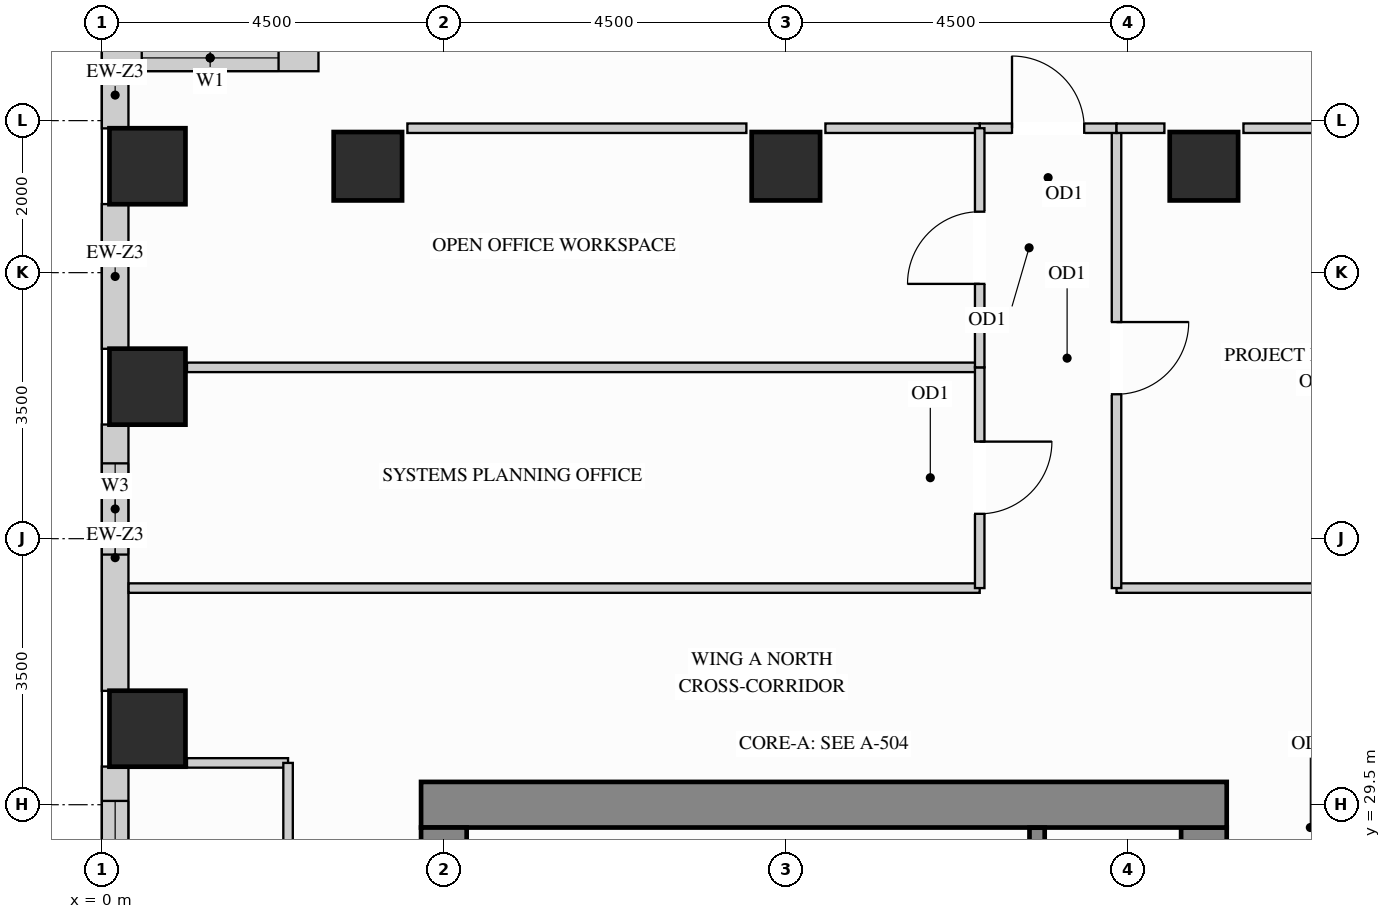
"""IFC4 building model, lengths in metres.
Left out: names, types, materials, properties, quantities, classifications, styles, units other than length and angle.
Written with IfcOpenShell. Run it as: python <this file> out.ifc"""

import sys

from ifc_helpers import new_model, si_unit, direction, frame, frame_2d, origin, origin_2d, place, context, subcontext, project, spatial, rectangle, extrude, source, transform, mapped, element, fill, save


model = new_model("IFC4")
c1 = context("Model", 3, precision=1e-05, world=origin(), true_north=direction((0.0, 1.0)))
c2 = subcontext(c1, "Body", "Model", "MODEL_VIEW")
j1 = project(units=[si_unit("LENGTHUNIT", "METRE"), si_unit("PLANEANGLEUNIT", "RADIAN")], contexts=[c1])
p1 = place(None, origin())
s1 = spatial("IfcSite", under=j1, at=p1, CompositionType="ELEMENT")
p2 = place(p1, origin())
s2 = spatial("IfcBuilding", under=s1, at=p2, CompositionType="ELEMENT")
p3 = place(p2, frame((0.0, 0.0, 197.1)))
s3 = spatial("IfcBuildingStorey", under=s2, at=p3, CompositionType="ELEMENT", Elevation=197.1)
m1 = source(origin(), c2, "Body", "SweptSolid", [
    extrude(rectangle(XDim=0.9, YDim=0.9, at=origin_2d()), origin(), (0.0, 0.0, 1.0), 3.4),
])
for number, where, z_axis, x_axis in (
    (1, (14.5, 37.9, 0.0), (0.0, 0.0, 1.0), (1.0, 0.0, 0.0)),
    (2, (3.5, 37.9, 0.0), (0.0, 0.0, 1.0), (1.0, 0.0, 0.0)),
    (3, (9.0, 37.9, 0.0), (0.0, 0.0, 1.0), (1.0, 0.0, 0.0)),
):
    element("IfcColumn", number, at=place(p3, frame(where, z_axis=z_axis, x_axis=x_axis)), inside=s3, PredefinedType="COLUMN", context=c2, shape_type="MappedRepresentation", body=[
        mapped(m1, transform((0.0, 0.0, 0.0), x_axis=(1.0, 0.0, 0.0), y_axis=(0.0, 1.0, 0.0), z_axis=(0.0, 0.0, 1.0))),
    ])
m2 = source(origin(), c2, "Body", "SweptSolid", [
    extrude(rectangle(XDim=1.0, YDim=1.0, at=origin_2d()), origin(), (0.0, 0.0, 1.0), 3.4),
])
for number, where, z_axis, x_axis in (
    (4, (0.6, 30.5, 0.0), (0.0, 0.0, 1.0), (1.0, 0.0, 0.0)),
    (5, (0.6, 35.0, 0.0), (0.0, 0.0, 1.0), (1.0, 0.0, 0.0)),
    (6, (0.6, 37.9, 0.0), (0.0, 0.0, 1.0), (1.0, 0.0, 0.0)),
):
    element("IfcColumn", number, at=place(p3, frame(where, z_axis=z_axis, x_axis=x_axis)), inside=s3, PredefinedType="COLUMN", context=c2, shape_type="MappedRepresentation", body=[
        mapped(m2, transform((0.0, 0.0, 0.0), x_axis=(1.0, 0.0, 0.0), y_axis=(0.0, 1.0, 0.0), z_axis=(0.0, 0.0, 1.0))),
    ])
m3 = source(origin(), c2, "Body", "SweptSolid", [
    extrude(rectangle(XDim=8.32, YDim=0.6, at=frame_2d((4.16, 0.0))), origin(), (0.0, 0.0, 1.0), 3.4),
])
p4 = place(p3, frame((14.5, 20.88, 0.0), z_axis=(0.0, 0.0, 1.0), x_axis=(0.0, 1.0, 0.0)))
e7 = element("IfcWall", 7, at=p4, inside=s3, PredefinedType="SHEAR", context=c2, shape_type="MappedRepresentation", body=[
    mapped(m3, transform((0.0, 0.0, 0.0), x_axis=(1.0, 0.0, 0.0), y_axis=(0.0, 1.0, 0.0), z_axis=(0.0, 0.0, 1.0))),
])
m4 = source(origin(), c2, "Body", "SweptSolid", [
    extrude(rectangle(XDim=10.6, YDim=0.6, at=frame_2d((5.3, 0.0))), origin(), (0.0, 0.0, 1.0), 3.4),
])
p5 = place(p3, frame((4.2, 29.5, 0.0), z_axis=(0.0, 0.0, 1.0), x_axis=(1.0, 0.0, 0.0)))
e8 = element("IfcWall", 8, at=p5, inside=s3, PredefinedType="SHEAR", context=c2, shape_type="MappedRepresentation", body=[
    mapped(m4, transform((0.0, 0.0, 0.0), x_axis=(1.0, 0.0, 0.0), y_axis=(0.0, 1.0, 0.0), z_axis=(0.0, 0.0, 1.0))),
])
m5 = source(origin(), c2, "Body", "SweptSolid", [
    extrude(rectangle(XDim=20.4, YDim=0.6, at=frame_2d((10.2, 0.0))), origin(), (0.0, 0.0, 1.0), 3.4),
])
p6 = place(p3, frame((4.5, 8.8, 0.0), z_axis=(0.0, 0.0, 1.0), x_axis=(0.0, 1.0, 0.0)))
e9 = element("IfcWall", 9, at=p6, inside=s3, PredefinedType="SHEAR", context=c2, shape_type="MappedRepresentation", body=[
    mapped(m5, transform((0.0, 0.0, 0.0), x_axis=(1.0, 0.0, 0.0), y_axis=(0.0, 1.0, 0.0), z_axis=(0.0, 0.0, 1.0))),
])
p7 = place(p3, frame((2.85, 39.325, 0.0), z_axis=(0.0, 0.0, 1.0), x_axis=(-1.0, 0.0, 0.0)))
e10 = element("IfcWall", 10, at=p7, inside=s3, PredefinedType="SOLIDWALL", context=c2, shape_type="SweptSolid", body=[
    extrude(rectangle(XDim=2.85, YDim=0.35, at=frame_2d((1.425, 0.0))), origin(), (0.0, 0.0, 1.0), 3.385),
])
p8 = place(p7, frame((0.525, 0.0, 0.78)))
e11 = element("IfcOpeningElement", 11, at=p8, cuts=e10, PredefinedType="OPENING", context=c2, shape_type="SweptSolid", body=[
    extrude(rectangle(XDim=1.8, YDim=2.1, at=frame_2d((0.9, 1.05))), frame((0.0, 0.185, 0.0), z_axis=(0.0, -1.0, 0.0), x_axis=(1.0, 0.0, 0.0)), (0.0, 0.0, 1.0), 0.37),
])
m6 = source(origin(), c2, "Body", "SweptSolid", [
    extrude(rectangle(XDim=0.754, YDim=0.35, at=frame_2d((0.377, 0.0))), origin(), (0.0, 0.0, 1.0), 3.385),
])
p9 = place(p3, frame((0.175, 39.152, 0.0), z_axis=(0.0, 0.0, 1.0), x_axis=(0.0, -1.0, 0.0)))
e12 = element("IfcWall", 12, at=p9, inside=s3, PredefinedType="SOLIDWALL", context=c2, shape_type="MappedRepresentation", body=[
    mapped(m6, transform((0.0, 0.0, 0.0), x_axis=(1.0, 0.0, 0.0), y_axis=(0.0, 1.0, 0.0), z_axis=(0.0, 0.0, 1.0))),
])
m7 = source(origin(), c2, "Body", "SweptSolid", [
    extrude(rectangle(XDim=1.904, YDim=0.35, at=frame_2d((0.952, 0.0))), origin(), (0.0, 0.0, 1.0), 2.612),
])
p10 = place(p3, frame((0.175, 37.402, 0.0), z_axis=(0.0, 0.0, 1.0), x_axis=(0.0, -1.0, 0.0)))
e13 = element("IfcWall", 13, at=p10, inside=s3, PredefinedType="SOLIDWALL", context=c2, shape_type="MappedRepresentation", body=[
    mapped(m7, transform((0.0, 0.0, 0.0), x_axis=(1.0, 0.0, 0.0), y_axis=(0.0, 1.0, 0.0), z_axis=(0.0, 0.0, 1.0))),
])
p11 = place(p3, frame((0.175, 34.502, 0.0), z_axis=(0.0, 0.0, 1.0), x_axis=(0.0, -1.0, 0.0)))
e14 = element("IfcWall", 14, at=p11, inside=s3, PredefinedType="SOLIDWALL", context=c2, shape_type="SweptSolid", body=[
    extrude(rectangle(XDim=3.504, YDim=0.35, at=frame_2d((1.752, 0.0))), origin(), (0.0, 0.0, 1.0), 2.612),
])
p12 = place(p11, frame((0.511, 0.0, 0.78)))
e15 = element("IfcOpeningElement", 15, at=p12, cuts=e14, PredefinedType="OPENING", context=c2, shape_type="SweptSolid", body=[
    extrude(rectangle(XDim=1.2, YDim=1.652, at=frame_2d((0.6, 0.826))), frame((0.0, 0.185, 0.0), z_axis=(0.0, -1.0, 0.0), x_axis=(1.0, 0.0, 0.0)), (0.0, 0.0, 1.0), 0.37),
])
p13 = place(p3, frame((0.175, 30.002, 0.0), z_axis=(0.0, 0.0, 1.0), x_axis=(0.0, -1.0, 0.0)))
e16 = element("IfcWall", 16, at=p13, inside=s3, PredefinedType="SOLIDWALL", context=c2, shape_type="SweptSolid", body=[
    extrude(rectangle(XDim=2.704, YDim=0.35, at=frame_2d((1.352, 0.0))), origin(), (0.0, 0.0, 1.0), 2.612),
])
p14 = place(p13, frame((0.452, 0.0, 0.78)))
e17 = element("IfcOpeningElement", 17, at=p14, cuts=e16, PredefinedType="OPENING", context=c2, shape_type="SweptSolid", body=[
    extrude(rectangle(XDim=1.8, YDim=1.652, at=frame_2d((0.9, 0.826))), frame((0.0, 0.185, 0.0), z_axis=(0.0, -1.0, 0.0), x_axis=(1.0, 0.0, 0.0)), (0.0, 0.0, 1.0), 0.37),
])
m8 = source(origin(), c2, "Body", "SweptSolid", [
    extrude(rectangle(XDim=5.798, YDim=0.125, at=frame_2d((2.899, 0.0))), origin(), (0.0, 0.0, 1.0), 3.385),
])
p15 = place(p3, frame((13.35, 32.35, 0.0), z_axis=(0.0, 0.0, 1.0), x_axis=(1.0, 0.0, 0.0)))
e18 = element("IfcWall", 18, at=p15, inside=s3, PredefinedType="PARTITIONING", context=c2, shape_type="MappedRepresentation", body=[
    mapped(m8, transform((0.0, 0.0, 0.0), x_axis=(1.0, 0.0, 0.0), y_axis=(0.0, 1.0, 0.0), z_axis=(0.0, 0.0, 1.0))),
])
m9 = source(origin(), c2, "Body", "SweptSolid", [
    extrude(rectangle(XDim=11.198, YDim=0.125, at=frame_2d((5.599, 0.0))), origin(), (0.0, 0.0, 1.0), 3.385),
])
p16 = place(p3, frame((0.352, 32.35, 0.0), z_axis=(0.0, 0.0, 1.0), x_axis=(1.0, 0.0, 0.0)))
e19 = element("IfcWall", 19, at=p16, inside=s3, PredefinedType="PARTITIONING", context=c2, shape_type="MappedRepresentation", body=[
    mapped(m9, transform((0.0, 0.0, 0.0), x_axis=(1.0, 0.0, 0.0), y_axis=(0.0, 1.0, 0.0), z_axis=(0.0, 0.0, 1.0))),
])
m10 = source(origin(), c2, "Body", "SweptSolid", [
    extrude(rectangle(XDim=10.43, YDim=0.125, at=frame_2d((5.215, 0.0))), origin(), (0.0, 0.0, 1.0), 2.448),
])
p17 = place(p3, frame((1.12, 35.254, 0.0), z_axis=(0.0, 0.0, 1.0), x_axis=(1.0, 0.0, 0.0)))
e20 = element("IfcWall", 20, at=p17, inside=s3, PredefinedType="PARTITIONING", context=c2, shape_type="MappedRepresentation", body=[
    mapped(m10, transform((0.0, 0.0, 0.0), x_axis=(1.0, 0.0, 0.0), y_axis=(0.0, 1.0, 0.0), z_axis=(0.0, 0.0, 1.0))),
])
m11 = source(origin(), c2, "Body", "SweptSolid", [
    extrude(rectangle(XDim=1.33, YDim=0.125, at=frame_2d((0.665, 0.0))), origin(), (0.0, 0.0, 1.0), 3.385),
])
p18 = place(p3, frame((1.12, 30.05, 0.0), z_axis=(0.0, 0.0, 1.0), x_axis=(1.0, 0.0, 0.0)))
e21 = element("IfcWall", 21, at=p18, inside=s3, PredefinedType="PARTITIONING", context=c2, shape_type="MappedRepresentation", body=[
    mapped(m11, transform((0.0, 0.0, 0.0), x_axis=(1.0, 0.0, 0.0), y_axis=(0.0, 1.0, 0.0), z_axis=(0.0, 0.0, 1.0))),
])
p19 = place(p3, frame((13.35, 32.35, 0.0), z_axis=(0.0, 0.0, 1.0), x_axis=(0.0, 1.0, 0.0)))
e22 = element("IfcWall", 22, at=p19, inside=s3, PredefinedType="PARTITIONING", context=c2, shape_type="SweptSolid", body=[
    extrude(rectangle(XDim=6.05, YDim=0.125, at=frame_2d((3.025, 0.0))), origin(), (0.0, 0.0, 1.0), 3.385),
])
p20 = place(p19, frame((2.55, 0.0, 0.0)))
e23 = element("IfcOpeningElement", 23, at=p20, cuts=e22, PredefinedType="OPENING", context=c2, shape_type="SweptSolid", body=[
    extrude(rectangle(XDim=0.95, YDim=2.15, at=frame_2d((0.475, 1.075))), frame((0.0, 0.073, 0.0), z_axis=(0.0, -1.0, 0.0), x_axis=(1.0, 0.0, 0.0)), (0.0, 0.0, 1.0), 0.145),
])
p21 = place(p3, frame((11.55, 38.4, 0.0), z_axis=(0.0, 0.0, 1.0), x_axis=(1.0, 0.0, 0.0)))
e24 = element("IfcWall", 24, at=p21, inside=s3, PredefinedType="PARTITIONING", context=c2, shape_type="SweptSolid", body=[
    extrude(rectangle(XDim=1.8, YDim=0.125, at=frame_2d((0.9, 0.0))), origin(), (0.0, 0.0, 1.0), 3.385),
])
p22 = place(p21, frame((0.425, 0.0, 0.0)))
e25 = element("IfcOpeningElement", 25, at=p22, cuts=e24, PredefinedType="OPENING", context=c2, shape_type="SweptSolid", body=[
    extrude(rectangle(XDim=0.95, YDim=2.15, at=frame_2d((0.475, 1.075))), frame((0.0, 0.073, 0.0), z_axis=(0.0, -1.0, 0.0), x_axis=(1.0, 0.0, 0.0)), (0.0, 0.0, 1.0), 0.145),
])
m12 = source(origin(), c2, "Body", "SweptSolid", [
    extrude(rectangle(XDim=0.63, YDim=0.125, at=frame_2d((0.315, 0.0))), origin(), (0.0, 0.0, 1.0), 3.385),
])
p23 = place(p3, frame((13.35, 38.4, 0.0), z_axis=(0.0, 0.0, 1.0), x_axis=(1.0, 0.0, 0.0)))
e26 = element("IfcWall", 26, at=p23, inside=s3, PredefinedType="PARTITIONING", context=c2, shape_type="MappedRepresentation", body=[
    mapped(m12, transform((0.0, 0.0, 0.0), x_axis=(1.0, 0.0, 0.0), y_axis=(0.0, 1.0, 0.0), z_axis=(0.0, 0.0, 1.0))),
])
m13 = source(origin(), c2, "Body", "SweptSolid", [
    extrude(rectangle(XDim=1.88, YDim=0.125, at=frame_2d((0.94, 0.0))), origin(), (0.0, 0.0, 1.0), 3.385),
])
p24 = place(p3, frame((15.02, 38.4, 0.0), z_axis=(0.0, 0.0, 1.0), x_axis=(1.0, 0.0, 0.0)))
e27 = element("IfcWall", 27, at=p24, inside=s3, PredefinedType="PARTITIONING", context=c2, shape_type="MappedRepresentation", body=[
    mapped(m13, transform((0.0, 0.0, 0.0), x_axis=(1.0, 0.0, 0.0), y_axis=(0.0, 1.0, 0.0), z_axis=(0.0, 0.0, 1.0))),
])
m14 = source(origin(), c2, "Body", "SweptSolid", [
    extrude(rectangle(XDim=4.46, YDim=0.125, at=frame_2d((2.23, 0.0))), origin(), (0.0, 0.0, 1.0), 3.385),
])
p25 = place(p3, frame((4.02, 38.4, 0.0), z_axis=(0.0, 0.0, 1.0), x_axis=(1.0, 0.0, 0.0)))
e28 = element("IfcWall", 28, at=p25, inside=s3, PredefinedType="PARTITIONING", context=c2, shape_type="MappedRepresentation", body=[
    mapped(m14, transform((0.0, 0.0, 0.0), x_axis=(1.0, 0.0, 0.0), y_axis=(0.0, 1.0, 0.0), z_axis=(0.0, 0.0, 1.0))),
])
m15 = source(origin(), c2, "Body", "SweptSolid", [
    extrude(rectangle(XDim=2.03, YDim=0.125, at=frame_2d((1.015, 0.0))), origin(), (0.0, 0.0, 1.0), 3.385),
])
p26 = place(p3, frame((9.52, 38.4, 0.0), z_axis=(0.0, 0.0, 1.0), x_axis=(1.0, 0.0, 0.0)))
e29 = element("IfcWall", 29, at=p26, inside=s3, PredefinedType="PARTITIONING", context=c2, shape_type="MappedRepresentation", body=[
    mapped(m15, transform((0.0, 0.0, 0.0), x_axis=(1.0, 0.0, 0.0), y_axis=(0.0, 1.0, 0.0), z_axis=(0.0, 0.0, 1.0))),
])
p27 = place(p3, frame((11.55, 32.35, 0.0), z_axis=(0.0, 0.0, 1.0), x_axis=(0.0, 1.0, 0.0)))
e30 = element("IfcWall", 30, at=p27, inside=s3, PredefinedType="PARTITIONING", context=c2, shape_type="SweptSolid", body=[
    extrude(rectangle(XDim=2.904, YDim=0.125, at=frame_2d((1.452, 0.0))), origin(), (0.0, 0.0, 1.0), 3.385),
])
p28 = place(p27, frame((0.977, 0.0, 0.0)))
e31 = element("IfcOpeningElement", 31, at=p28, cuts=e30, PredefinedType="OPENING", context=c2, shape_type="SweptSolid", body=[
    extrude(rectangle(XDim=0.95, YDim=2.15, at=frame_2d((0.475, 1.075))), frame((0.0, 0.073, 0.0), z_axis=(0.0, -1.0, 0.0), x_axis=(1.0, 0.0, 0.0)), (0.0, 0.0, 1.0), 0.145),
])
p29 = place(p3, frame((11.55, 35.254, 0.0), z_axis=(0.0, 0.0, 1.0), x_axis=(0.0, 1.0, 0.0)))
e32 = element("IfcWall", 32, at=p29, inside=s3, PredefinedType="PARTITIONING", context=c2, shape_type="SweptSolid", body=[
    extrude(rectangle(XDim=3.146, YDim=0.125, at=frame_2d((1.573, 0.0))), origin(), (0.0, 0.0, 1.0), 3.385),
])
p30 = place(p29, frame((1.098, 0.0, 0.0)))
e33 = element("IfcOpeningElement", 33, at=p30, cuts=e32, PredefinedType="OPENING", context=c2, shape_type="SweptSolid", body=[
    extrude(rectangle(XDim=0.95, YDim=2.15, at=frame_2d((0.475, 1.075))), frame((0.0, 0.073, 0.0), z_axis=(0.0, -1.0, 0.0), x_axis=(1.0, 0.0, 0.0)), (0.0, 0.0, 1.0), 0.145),
])
p31 = place(p3, frame((2.45, 22.6, 0.0), z_axis=(0.0, 0.0, 1.0), x_axis=(0.0, 1.0, 0.0)))
e34 = element("IfcWall", 34, at=p31, inside=s3, PredefinedType="PARTITIONING", context=c2, shape_type="SweptSolid", body=[
    extrude(rectangle(XDim=7.45, YDim=0.125, at=frame_2d((3.725, 0.0))), origin(), (0.0, 0.0, 1.0), 3.385),
])
p32 = place(p31, frame((3.25, 0.0, 0.0)))
e35 = element("IfcOpeningElement", 35, at=p32, cuts=e34, PredefinedType="OPENING", context=c2, shape_type="SweptSolid", body=[
    extrude(rectangle(XDim=0.95, YDim=2.15, at=frame_2d((0.475, 1.075))), frame((0.0, 0.073, 0.0), z_axis=(0.0, -1.0, 0.0), x_axis=(1.0, 0.0, 0.0)), (0.0, 0.0, 1.0), 0.145),
])
m16 = source(origin(), c2, "Body", "SweptSolid", [
    extrude(rectangle(XDim=3.753, YDim=0.2, at=frame_2d((1.876, 0.0))), origin(), (0.0, 0.0, 1.0), 3.4),
])
p33 = place(p3, frame((12.305, 25.445, 0.0), z_axis=(0.0, 0.0, 1.0), x_axis=(0.0, 1.0, 0.0)))
e36 = element("IfcWall", 36, at=p33, inside=s3, PredefinedType="SHEAR", context=c2, shape_type="MappedRepresentation", body=[
    mapped(m16, transform((0.0, 0.0, 0.0), x_axis=(1.0, 0.0, 0.0), y_axis=(0.0, 1.0, 0.0), z_axis=(0.0, 0.0, 1.0))),
])
m17 = source(origin(), c2, "Body", "SweptSolid", [
    extrude(rectangle(XDim=0.95, YDim=2.15, at=frame_2d((0.475, 1.075))), frame((0.0, 0.025, 0.0), z_axis=(0.0, -1.0, 0.0), x_axis=(1.0, 0.0, 0.0)), (0.0, 0.0, 1.0), 0.05),
])
p34 = place(p20, origin())
e37 = element("IfcDoor", 37, at=p34, inside=s3, OperationType="SINGLE_SWING_RIGHT", PredefinedType="DOOR", context=c2, shape_type="MappedRepresentation", body=[
    mapped(m17, transform((0.0, 0.0, 0.0), x_axis=(1.0, 0.0, 0.0), y_axis=(0.0, 1.0, 0.0), z_axis=(0.0, 0.0, 1.0))),
])
fill(e23, e37)
p35 = place(p22, origin())
e38 = element("IfcDoor", 38, at=p35, inside=s3, OperationType="SINGLE_SWING_LEFT", PredefinedType="DOOR", context=c2, shape_type="MappedRepresentation", body=[
    mapped(m17, transform((0.0, 0.0, 0.0), x_axis=(1.0, 0.0, 0.0), y_axis=(0.0, 1.0, 0.0), z_axis=(0.0, 0.0, 1.0))),
])
fill(e25, e38)
p36 = place(p28, origin())
e39 = element("IfcDoor", 39, at=p36, inside=s3, OperationType="SINGLE_SWING_RIGHT", PredefinedType="DOOR", context=c2, shape_type="MappedRepresentation", body=[
    mapped(m17, transform((0.0, 0.0, 0.0), x_axis=(1.0, 0.0, 0.0), y_axis=(0.0, 1.0, 0.0), z_axis=(0.0, 0.0, 1.0))),
])
fill(e31, e39)
p37 = place(p30, origin())
e40 = element("IfcDoor", 40, at=p37, inside=s3, OperationType="SINGLE_SWING_LEFT", PredefinedType="DOOR", context=c2, shape_type="MappedRepresentation", body=[
    mapped(m17, transform((0.0, 0.0, 0.0), x_axis=(1.0, 0.0, 0.0), y_axis=(0.0, 1.0, 0.0), z_axis=(0.0, 0.0, 1.0))),
])
fill(e33, e40)
m18 = source(origin(), c2, "Body", "SweptSolid", [
    extrude(rectangle(XDim=1.8, YDim=2.1, at=frame_2d((0.9, 1.05))), frame((0.0, 0.03, 0.0), z_axis=(0.0, -1.0, 0.0), x_axis=(1.0, 0.0, 0.0)), (0.0, 0.0, 1.0), 0.06),
])
p38 = place(p8, origin())
e41 = element("IfcWindow", 41, at=p38, inside=s3, PartitioningType="SINGLE_PANEL", PredefinedType="WINDOW", context=c2, shape_type="MappedRepresentation", body=[
    mapped(m18, transform((0.0, 0.0, 0.0), x_axis=(1.0, 0.0, 0.0), y_axis=(0.0, 1.0, 0.0), z_axis=(0.0, 0.0, 1.0))),
])
fill(e11, e41)
m19 = source(origin(), c2, "Body", "SweptSolid", [
    extrude(rectangle(XDim=1.8, YDim=1.652, at=frame_2d((0.9, 0.826))), frame((0.0, 0.03, 0.0), z_axis=(0.0, -1.0, 0.0), x_axis=(1.0, 0.0, 0.0)), (0.0, 0.0, 1.0), 0.06),
])
p39 = place(p14, origin())
e42 = element("IfcWindow", 42, at=p39, inside=s3, PartitioningType="SINGLE_PANEL", PredefinedType="WINDOW", context=c2, shape_type="MappedRepresentation", body=[
    mapped(m19, transform((0.0, 0.0, 0.0), x_axis=(1.0, 0.0, 0.0), y_axis=(0.0, 1.0, 0.0), z_axis=(0.0, 0.0, 1.0))),
])
fill(e17, e42)
m20 = source(origin(), c2, "Body", "SweptSolid", [
    extrude(rectangle(XDim=1.2, YDim=1.652, at=frame_2d((0.6, 0.826))), frame((0.0, 0.03, 0.0), z_axis=(0.0, -1.0, 0.0), x_axis=(1.0, 0.0, 0.0)), (0.0, 0.0, 1.0), 0.06),
])
p40 = place(p12, origin())
e43 = element("IfcWindow", 43, at=p40, inside=s3, PartitioningType="SINGLE_PANEL", PredefinedType="WINDOW", context=c2, shape_type="MappedRepresentation", body=[
    mapped(m20, transform((0.0, 0.0, 0.0), x_axis=(1.0, 0.0, 0.0), y_axis=(0.0, 1.0, 0.0), z_axis=(0.0, 0.0, 1.0))),
])
fill(e15, e43)
save(model, sys.argv[1])
